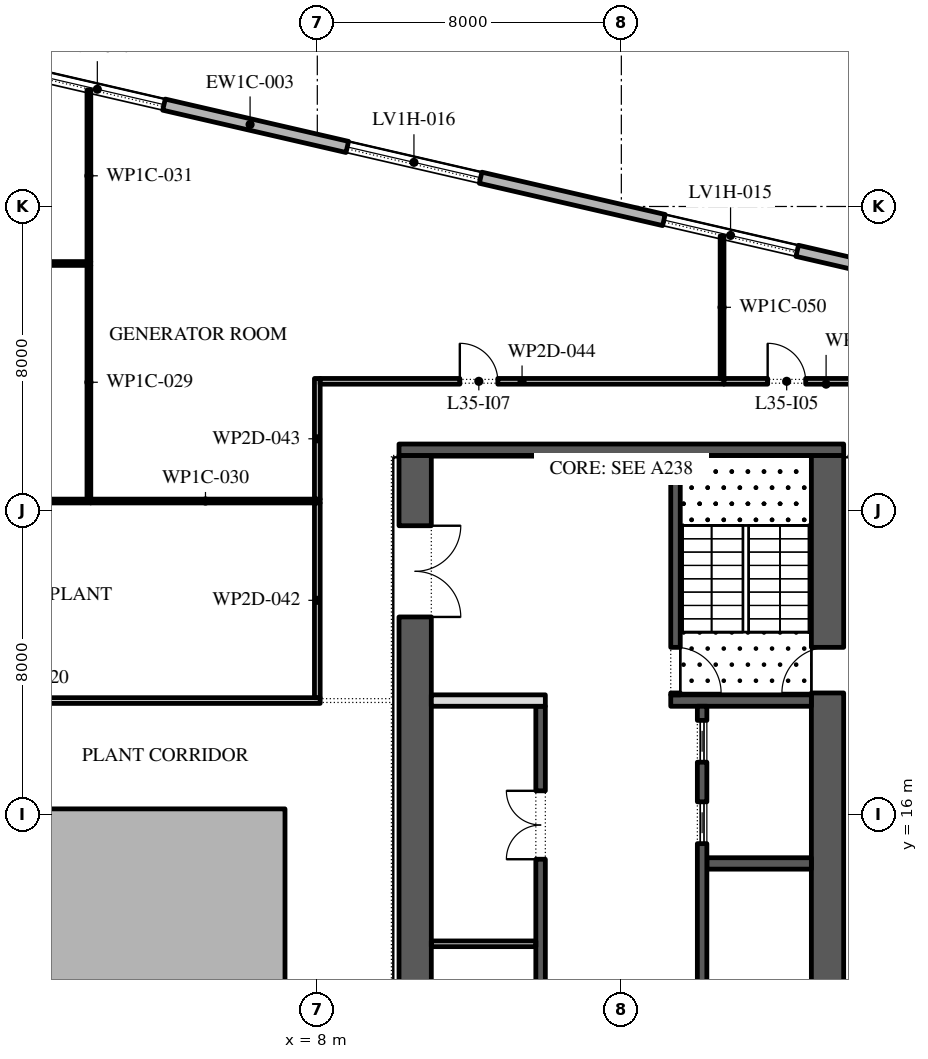
"""IFC4 building model, lengths in metres.
Left out: names, types, materials, properties, quantities, classifications, styles, units other than length and angle.
Written with IfcOpenShell. Run it as: python <this file> out.ifc"""

import sys

from ifc_helpers import new_model, si_unit, direction, frame, frame_2d, origin, place, context, subcontext, project, spatial, polyline, rectangle, outline, extrude, element, fill, save


model = new_model("IFC4")
c1 = context("Model", 3, precision=1e-05, world=origin(), true_north=direction((0.0, 1.0)))
c2 = subcontext(c1, "Body", "Model", "MODEL_VIEW")
j1 = project(units=[si_unit("LENGTHUNIT", "METRE"), si_unit("PLANEANGLEUNIT", "RADIAN")], contexts=[c1])
p1 = place(None, origin())
s1 = spatial("IfcSite", under=j1, at=p1, CompositionType="ELEMENT")
p2 = place(p1, origin())
s2 = spatial("IfcBuilding", under=s1, at=p2, CompositionType="ELEMENT")
p3 = place(p2, frame((0.0, 0.0, 160.2)))
s3 = spatial("IfcBuildingStorey", under=s2, at=p3, CompositionType="ELEMENT", Elevation=160.2)
p4 = place(p3, origin())
e1 = element("IfcWall", 1, at=p4, inside=s3, PredefinedType="STANDARD", context=c2, shape_type="SweptSolid", body=[
    extrude(outline(polyline([(-7.15, -2.15), (7.15, -2.15), (7.15, 16.15), (-7.15, 16.15), (-7.15, -2.15)]), holes=[polyline([(-7.0, -2.0), (-7.0, 16.0), (7.0, 16.0), (7.0, -2.0), (-7.0, -2.0)])]), origin(), (0.0, 0.0, 1.0), 4.95),
])
p5 = place(p3, frame((31.078, 28.421, 0.0), z_axis=(0.0, 0.0, 1.0), x_axis=(-0.974370456532, 0.224949357493, 0.0)))
e2 = element("IfcWall", 2, at=p5, inside=s3, PredefinedType="STANDARD", context=c2, shape_type="SweptSolid", body=[
    extrude(rectangle(XDim=51.0, YDim=0.3, at=frame_2d((25.5, 0.0))), origin(), (0.0, 0.0, 1.0), 4.95),
])
p6 = place(p5, frame((10.725, 0.0, 0.6)))
e3 = element("IfcOpeningElement", 3, at=p6, cuts=e2, PredefinedType="OPENING", context=c2, shape_type="SweptSolid", body=[
    extrude(rectangle(XDim=3.6, YDim=3.25, at=frame_2d((1.8, 1.625))), frame((0.0, 0.16, 0.0), z_axis=(0.0, -1.0, 0.0), x_axis=(1.0, 0.0, 0.0)), (0.0, 0.0, 1.0), 0.32),
])
p7 = place(p5, frame((19.275, 0.0, 0.6)))
e4 = element("IfcOpeningElement", 4, at=p7, cuts=e2, PredefinedType="OPENING", context=c2, shape_type="SweptSolid", body=[
    extrude(rectangle(XDim=3.6, YDim=3.25, at=frame_2d((1.8, 1.625))), frame((0.0, 0.16, 0.0), z_axis=(0.0, -1.0, 0.0), x_axis=(1.0, 0.0, 0.0)), (0.0, 0.0, 1.0), 0.32),
])
p8 = place(p5, frame((27.825, 0.0, 0.6)))
e5 = element("IfcOpeningElement", 5, at=p8, cuts=e2, PredefinedType="OPENING", context=c2, shape_type="SweptSolid", body=[
    extrude(rectangle(XDim=3.6, YDim=3.9, at=frame_2d((1.8, 1.95))), frame((0.0, 0.16, 0.0), z_axis=(0.0, -1.0, 0.0), x_axis=(1.0, 0.0, 0.0)), (0.0, 0.0, 1.0), 0.32),
])
p9 = place(p5, frame((36.375, 0.0, 0.6)))
e6 = element("IfcOpeningElement", 6, at=p9, cuts=e2, PredefinedType="OPENING", context=c2, shape_type="SweptSolid", body=[
    extrude(rectangle(XDim=3.6, YDim=3.375, at=frame_2d((1.8, 1.688))), frame((0.0, 0.16, 0.0), z_axis=(0.0, -1.0, 0.0), x_axis=(1.0, 0.0, 0.0)), (0.0, 0.0, 1.0), 0.32),
])
p10 = place(p3, frame((34.5, 35.112, -0.05), z_axis=(0.0, 0.0, 1.0), x_axis=(-0.974370602864, 0.224948723658, 0.0)))
e7 = element("IfcWall", 7, at=p10, inside=s3, PredefinedType="STANDARD", context=c2, shape_type="SweptSolid", body=[
    extrude(rectangle(XDim=54.56, YDim=0.2, at=frame_2d((27.28, 0.0))), origin(), (0.0, 0.0, 1.0), 1.1),
])
p11 = place(p3, frame((21.425, -2.45, 0.0), z_axis=(0.0, 0.0, 1.0), x_axis=(0.0, 1.0, 0.0)))
e8 = element("IfcWall", 8, at=p11, inside=s3, PredefinedType="SHEAR", context=c2, shape_type="SweptSolid", body=[
    extrude(rectangle(XDim=27.9, YDim=0.85, at=frame_2d((13.95, 0.0))), origin(), (0.0, 0.0, 1.0), 4.95),
])
p12 = place(p11, frame((5.05, 0.0, 0.0)))
e9 = element("IfcOpeningElement", 9, at=p12, cuts=e8, PredefinedType="OPENING", context=c2, shape_type="SweptSolid", body=[
    extrude(rectangle(XDim=1.2, YDim=2.1, at=frame_2d((0.6, 1.05))), frame((0.0, 0.435, 0.0), z_axis=(0.0, -1.0, 0.0), x_axis=(1.0, 0.0, 0.0)), (0.0, 0.0, 1.0), 0.87),
])
p13 = place(p11, frame((21.65, 0.0, 0.0)))
e10 = element("IfcOpeningElement", 10, at=p13, cuts=e8, PredefinedType="OPENING", context=c2, shape_type="SweptSolid", body=[
    extrude(rectangle(XDim=1.2, YDim=2.1, at=frame_2d((0.6, 1.05))), frame((0.0, 0.435, 0.0), z_axis=(0.0, -1.0, 0.0), x_axis=(1.0, 0.0, 0.0)), (0.0, 0.0, 1.0), 0.87),
])
p14 = place(p3, frame((10.575, -2.45, 0.0), z_axis=(0.0, 0.0, 1.0), x_axis=(0.0, 1.0, 0.0)))
e11 = element("IfcWall", 11, at=p14, inside=s3, PredefinedType="SHEAR", context=c2, shape_type="SweptSolid", body=[
    extrude(rectangle(XDim=27.9, YDim=0.85, at=frame_2d((13.95, 0.0))), origin(), (0.0, 0.0, 1.0), 4.95),
])
p15 = place(p14, frame((23.65, 0.0, 0.0)))
e12 = element("IfcOpeningElement", 12, at=p15, cuts=e11, PredefinedType="OPENING", context=c2, shape_type="SweptSolid", body=[
    extrude(rectangle(XDim=2.4, YDim=2.1, at=frame_2d((1.2, 1.05))), frame((0.0, 0.435, 0.0), z_axis=(0.0, -1.0, 0.0), x_axis=(1.0, 0.0, 0.0)), (0.0, 0.0, 1.0), 0.87),
])
p16 = place(p14, frame((0.938, 0.0, 0.0)))
e13 = element("IfcOpeningElement", 13, at=p16, cuts=e11, PredefinedType="OPENING", context=c2, shape_type="SweptSolid", body=[
    extrude(rectangle(XDim=1.8, YDim=2.4, at=frame_2d((0.9, 1.2))), frame((0.0, 0.435, 0.0), z_axis=(0.0, -1.0, 0.0), x_axis=(1.0, 0.0, 0.0)), (0.0, 0.0, 1.0), 0.87),
])
p17 = place(p14, frame((4.163, 0.0, 0.0)))
e14 = element("IfcOpeningElement", 14, at=p17, cuts=e11, PredefinedType="OPENING", context=c2, shape_type="SweptSolid", body=[
    extrude(rectangle(XDim=1.8, YDim=2.4, at=frame_2d((0.9, 1.2))), frame((0.0, 0.435, 0.0), z_axis=(0.0, -1.0, 0.0), x_axis=(1.0, 0.0, 0.0)), (0.0, 0.0, 1.0), 0.87),
])
p18 = place(p3, frame((10.15, 25.6, 0.0), z_axis=(0.0, 0.0, 1.0), x_axis=(1.0, 0.0, 0.0)))
e15 = element("IfcWall", 15, at=p18, inside=s3, PredefinedType="SHEAR", context=c2, shape_type="SweptSolid", body=[
    extrude(rectangle(XDim=11.7, YDim=0.3, at=frame_2d((5.85, 0.0))), origin(), (0.0, 0.0, 1.0), 4.95),
])
p19 = place(p3, frame((17.3, 19.0, 0.0), z_axis=(0.0, 0.0, 1.0), x_axis=(1.0, 0.0, 0.0)))
e16 = element("IfcWall", 16, at=p19, inside=s3, PredefinedType="SHEAR", context=c2, shape_type="SweptSolid", body=[
    extrude(rectangle(XDim=3.7, YDim=0.3, at=frame_2d((1.85, 0.0))), origin(), (0.0, 0.0, 1.0), 4.95),
])
p20 = place(p3, frame((17.425, 19.15, 0.0), z_axis=(0.0, 0.0, 1.0), x_axis=(0.0, 1.0, 0.0)))
e17 = element("IfcWall", 17, at=p20, inside=s3, PredefinedType="SHEAR", context=c2, shape_type="SweptSolid", body=[
    extrude(rectangle(XDim=6.3, YDim=0.25, at=frame_2d((3.15, 0.0))), origin(), (0.0, 0.0, 1.0), 4.95),
])
p21 = place(p20, frame((0.05, 0.0, 0.0)))
e18 = element("IfcOpeningElement", 18, at=p21, cuts=e17, PredefinedType="OPENING", context=c2, shape_type="SweptSolid", body=[
    extrude(rectangle(XDim=1.2, YDim=2.1, at=frame_2d((0.6, 1.05))), frame((0.0, 0.135, 0.0), z_axis=(0.0, -1.0, 0.0), x_axis=(1.0, 0.0, 0.0)), (0.0, 0.0, 1.0), 0.27),
])
p22 = place(p3, frame((18.25, 14.714, 0.0), z_axis=(0.0, 0.0, 1.0), x_axis=(1.0, 0.0, 0.0)))
e19 = element("IfcWall", 19, at=p22, inside=s3, PredefinedType="SHEAR", context=c2, shape_type="SweptSolid", body=[
    extrude(rectangle(XDim=2.75, YDim=0.3, at=frame_2d((1.375, 0.0))), origin(), (0.0, 0.0, 1.0), 4.95),
])
p23 = place(p3, frame((18.125, 4.15, 0.0), z_axis=(0.0, 0.0, 1.0), x_axis=(0.0, 1.0, 0.0)))
e20 = element("IfcWall", 20, at=p23, inside=s3, PredefinedType="SHEAR", context=c2, shape_type="SweptSolid", body=[
    extrude(rectangle(XDim=14.7, YDim=0.25, at=frame_2d((7.35, 0.0))), origin(), (0.0, 0.0, 1.0), 4.95),
])
p24 = place(p23, frame((0.371, 0.0, 0.0)))
e21 = element("IfcOpeningElement", 21, at=p24, cuts=e20, PredefinedType="OPENING", context=c2, shape_type="SweptSolid", body=[
    extrude(rectangle(XDim=1.1, YDim=2.1, at=frame_2d((0.55, 1.05))), frame((0.0, 0.135, 0.0), z_axis=(0.0, -1.0, 0.0), x_axis=(1.0, 0.0, 0.0)), (0.0, 0.0, 1.0), 0.27),
])
p25 = place(p23, frame((11.086, 0.0, 0.0)))
e22 = element("IfcOpeningElement", 22, at=p25, cuts=e20, PredefinedType="OPENING", context=c2, shape_type="SweptSolid", body=[
    extrude(rectangle(XDim=1.1, YDim=2.1, at=frame_2d((0.55, 1.05))), frame((0.0, 0.135, 0.0), z_axis=(0.0, -1.0, 0.0), x_axis=(1.0, 0.0, 0.0)), (0.0, 0.0, 1.0), 0.27),
])
p26 = place(p23, frame((13.229, 0.0, 0.0)))
e23 = element("IfcOpeningElement", 23, at=p26, cuts=e20, PredefinedType="OPENING", context=c2, shape_type="SweptSolid", body=[
    extrude(rectangle(XDim=1.1, YDim=2.1, at=frame_2d((0.55, 1.05))), frame((0.0, 0.135, 0.0), z_axis=(0.0, -1.0, 0.0), x_axis=(1.0, 0.0, 0.0)), (0.0, 0.0, 1.0), 0.27),
])
p27 = place(p3, frame((13.875, -2.45, 0.0), z_axis=(0.0, 0.0, 1.0), x_axis=(0.0, 1.0, 0.0)))
e24 = element("IfcWall", 24, at=p27, inside=s3, PredefinedType="SHEAR", context=c2, shape_type="SweptSolid", body=[
    extrude(rectangle(XDim=21.3, YDim=0.25, at=frame_2d((10.65, 0.0))), origin(), (0.0, 0.0, 1.0), 4.95),
])
p28 = place(p27, frame((10.996, 0.0, 0.0)))
e25 = element("IfcOpeningElement", 25, at=p28, cuts=e24, PredefinedType="OPENING", context=c2, shape_type="SweptSolid", body=[
    extrude(rectangle(XDim=1.8, YDim=2.4, at=frame_2d((0.9, 1.2))), frame((0.0, 0.135, 0.0), z_axis=(0.0, -1.0, 0.0), x_axis=(1.0, 0.0, 0.0)), (0.0, 0.0, 1.0), 0.27),
])
p29 = place(p27, frame((17.275, 0.0, 0.0)))
e26 = element("IfcOpeningElement", 26, at=p29, cuts=e24, PredefinedType="OPENING", context=c2, shape_type="SweptSolid", body=[
    extrude(rectangle(XDim=1.8, YDim=2.4, at=frame_2d((0.9, 1.2))), frame((0.0, 0.135, 0.0), z_axis=(0.0, -1.0, 0.0), x_axis=(1.0, 0.0, 0.0)), (0.0, 0.0, 1.0), 0.27),
])
p30 = place(p27, frame((6.971, 0.0, 0.0)))
e27 = element("IfcOpeningElement", 27, at=p30, cuts=e24, PredefinedType="OPENING", context=c2, shape_type="SweptSolid", body=[
    extrude(rectangle(XDim=1.1, YDim=2.1, at=frame_2d((0.55, 1.05))), frame((0.0, 0.135, 0.0), z_axis=(0.0, -1.0, 0.0), x_axis=(1.0, 0.0, 0.0)), (0.0, 0.0, 1.0), 0.27),
])
p31 = place(p3, frame((11.0, 19.0, 0.0), z_axis=(0.0, 0.0, 1.0), x_axis=(1.0, 0.0, 0.0)))
e28 = element("IfcWall", 28, at=p31, inside=s3, PredefinedType="PARTITIONING", context=c2, shape_type="SweptSolid", body=[
    extrude(rectangle(XDim=3.0, YDim=0.3, at=frame_2d((1.5, 0.0))), origin(), (0.0, 0.0, 1.0), 4.95),
])
p32 = place(p3, frame((11.0, 12.6, 0.0), z_axis=(0.0, 0.0, 1.0), x_axis=(1.0, 0.0, 0.0)))
e29 = element("IfcWall", 29, at=p32, inside=s3, PredefinedType="PARTITIONING", context=c2, shape_type="SweptSolid", body=[
    extrude(rectangle(XDim=2.75, YDim=0.15, at=frame_2d((1.375, 0.0))), origin(), (0.0, 0.0, 1.0), 4.95),
])
p33 = place(p3, frame((-14.62, 30.5, 0.0), z_axis=(0.0, 0.0, 1.0), x_axis=(1.0, 0.0, 0.0)))
e30 = element("IfcWall", 30, at=p33, inside=s3, PredefinedType="PARTITIONING", context=c2, shape_type="SweptSolid", body=[
    extrude(rectangle(XDim=16.66, YDim=0.1, at=frame_2d((8.33, 0.0))), origin(), (0.0, 0.0, 1.0), 4.95),
])
p34 = place(p33, frame((9.51, 0.0, 0.0)))
e31 = element("IfcOpeningElement", 31, at=p34, cuts=e30, PredefinedType="OPENING", context=c2, shape_type="SweptSolid", body=[
    extrude(rectangle(XDim=0.9, YDim=2.1, at=frame_2d((0.45, 1.05))), frame((0.0, 0.06, 0.0), z_axis=(0.0, -1.0, 0.0), x_axis=(1.0, 0.0, 0.0)), (0.0, 0.0, 1.0), 0.12),
])
p35 = place(p3, frame((-8.075, 19.0, 0.0), z_axis=(0.0, 0.0, 1.0), x_axis=(1.0, 0.0, 0.0)))
e32 = element("IfcWall", 32, at=p35, inside=s3, PredefinedType="PARTITIONING", context=c2, shape_type="SweptSolid", body=[
    extrude(rectangle(XDim=16.15, YDim=0.15, at=frame_2d((8.075, 0.0))), origin(), (0.0, 0.0, 1.0), 4.95),
])
p36 = place(p35, frame((5.925, 0.0, 0.0)))
e33 = element("IfcOpeningElement", 33, at=p36, cuts=e32, PredefinedType="OPENING", context=c2, shape_type="SweptSolid", body=[
    extrude(rectangle(XDim=1.0, YDim=2.1, at=frame_2d((0.5, 1.05))), frame((0.0, 0.085, 0.0), z_axis=(0.0, -1.0, 0.0), x_axis=(1.0, 0.0, 0.0)), (0.0, 0.0, 1.0), 0.17),
])
p37 = place(p3, frame((-7.925, 24.25, 0.0), z_axis=(0.0, 0.0, 1.0), x_axis=(1.0, 0.0, 0.0)))
e34 = element("IfcWall", 34, at=p37, inside=s3, PredefinedType="PARTITIONING", context=c2, shape_type="SweptSolid", body=[
    extrude(rectangle(XDim=9.965, YDim=0.1, at=frame_2d((4.982, 0.0))), origin(), (0.0, 0.0, 1.0), 4.95),
])
p38 = place(p3, frame((1.99, 24.3, 0.0), z_axis=(0.0, 0.0, 1.0), x_axis=(0.0, 1.0, 0.0)))
e35 = element("IfcWall", 35, at=p38, inside=s3, PredefinedType="PARTITIONING", context=c2, shape_type="SweptSolid", body=[
    extrude(rectangle(XDim=6.15, YDim=0.1, at=frame_2d((3.075, 0.0))), origin(), (0.0, 0.0, 1.0), 4.95),
])
p39 = place(p3, frame((2.04, 24.25, 0.0), z_axis=(0.0, 0.0, 1.0), x_axis=(1.0, 0.0, 0.0)))
e36 = element("IfcWall", 36, at=p39, inside=s3, PredefinedType="PARTITIONING", context=c2, shape_type="SweptSolid", body=[
    extrude(rectangle(XDim=6.035, YDim=0.1, at=frame_2d((3.018, 0.0))), origin(), (0.0, 0.0, 1.0), 4.95),
])
p40 = place(p3, frame((1.99, 30.55, 0.0), z_axis=(0.0, 0.0, 1.0), x_axis=(0.0, 1.0, 0.0)))
e37 = element("IfcWall", 37, at=p40, inside=s3, PredefinedType="PARTITIONING", context=c2, shape_type="SweptSolid", body=[
    extrude(rectangle(XDim=4.515, YDim=0.1, at=frame_2d((2.257, 0.0))), origin(), (0.0, 0.0, 1.0), 4.95),
])
p41 = place(p3, frame((8.0, 19.075, 0.0), z_axis=(0.0, 0.0, 1.0), x_axis=(0.0, 1.0, 0.0)))
e38 = element("IfcWall", 38, at=p41, inside=s3, PredefinedType="PARTITIONING", context=c2, shape_type="SweptSolid", body=[
    extrude(rectangle(XDim=5.125, YDim=0.15, at=frame_2d((2.562, 0.0))), origin(), (0.0, 0.0, 1.0), 4.95),
])
p42 = place(p3, frame((8.0, 24.3, 0.0), z_axis=(0.0, 0.0, 1.0), x_axis=(0.0, 1.0, 0.0)))
e39 = element("IfcWall", 39, at=p42, inside=s3, PredefinedType="PARTITIONING", context=c2, shape_type="SweptSolid", body=[
    extrude(rectangle(XDim=3.175, YDim=0.15, at=frame_2d((1.587, 0.0))), origin(), (0.0, 0.0, 1.0), 4.95),
])
p43 = place(p3, frame((8.075, 27.4, 0.0), z_axis=(0.0, 0.0, 1.0), x_axis=(1.0, 0.0, 0.0)))
e40 = element("IfcWall", 40, at=p43, inside=s3, PredefinedType="PARTITIONING", context=c2, shape_type="SweptSolid", body=[
    extrude(rectangle(XDim=10.625, YDim=0.15, at=frame_2d((5.312, 0.0))), origin(), (0.0, 0.0, 1.0), 4.95),
])
p44 = place(p43, frame((3.675, 0.0, 0.0)))
e41 = element("IfcOpeningElement", 41, at=p44, cuts=e40, PredefinedType="OPENING", context=c2, shape_type="SweptSolid", body=[
    extrude(rectangle(XDim=1.0, YDim=2.1, at=frame_2d((0.5, 1.05))), frame((0.0, 0.085, 0.0), z_axis=(0.0, -1.0, 0.0), x_axis=(1.0, 0.0, 0.0)), (0.0, 0.0, 1.0), 0.17),
])
p45 = place(p3, frame((18.65, 27.475, 0.0), z_axis=(0.0, 0.0, 1.0), x_axis=(0.0, 1.0, 0.0)))
e42 = element("IfcWall", 42, at=p45, inside=s3, PredefinedType="PARTITIONING", context=c2, shape_type="SweptSolid", body=[
    extrude(rectangle(XDim=3.744, YDim=0.1, at=frame_2d((1.872, 0.0))), origin(), (0.0, 0.0, 1.0), 4.95),
])
p46 = place(p3, frame((18.7, 27.4, 0.0), z_axis=(0.0, 0.0, 1.0), x_axis=(1.0, 0.0, 0.0)))
e43 = element("IfcWall", 43, at=p46, inside=s3, PredefinedType="PARTITIONING", context=c2, shape_type="SweptSolid", body=[
    extrude(rectangle(XDim=5.375, YDim=0.15, at=frame_2d((2.688, 0.0))), origin(), (0.0, 0.0, 1.0), 4.95),
])
p47 = place(p46, frame((1.15, 0.0, 0.0)))
e44 = element("IfcOpeningElement", 44, at=p47, cuts=e43, PredefinedType="OPENING", context=c2, shape_type="SweptSolid", body=[
    extrude(rectangle(XDim=1.0, YDim=2.1, at=frame_2d((0.5, 1.05))), frame((0.0, 0.085, 0.0), z_axis=(0.0, -1.0, 0.0), x_axis=(1.0, 0.0, 0.0)), (0.0, 0.0, 1.0), 0.17),
])
p48 = place(p6, origin())
e45 = element("IfcWindow", 45, at=p48, inside=s3, PartitioningType="DOUBLE_PANEL_HORIZONTAL", PredefinedType="WINDOW", context=c2, shape_type="SweptSolid", body=[
    extrude(rectangle(XDim=3.6, YDim=3.25, at=frame_2d((1.8, 1.625))), frame((0.0, 0.03, 0.0), z_axis=(0.0, -1.0, 0.0), x_axis=(1.0, 0.0, 0.0)), (0.0, 0.0, 1.0), 0.06),
])
fill(e3, e45)
p49 = place(p7, origin())
e46 = element("IfcWindow", 46, at=p49, inside=s3, PartitioningType="DOUBLE_PANEL_HORIZONTAL", PredefinedType="WINDOW", context=c2, shape_type="SweptSolid", body=[
    extrude(rectangle(XDim=3.6, YDim=3.25, at=frame_2d((1.8, 1.625))), frame((0.0, 0.03, 0.0), z_axis=(0.0, -1.0, 0.0), x_axis=(1.0, 0.0, 0.0)), (0.0, 0.0, 1.0), 0.06),
])
fill(e4, e46)
p50 = place(p8, origin())
e47 = element("IfcWindow", 47, at=p50, inside=s3, PartitioningType="DOUBLE_PANEL_HORIZONTAL", PredefinedType="WINDOW", context=c2, shape_type="SweptSolid", body=[
    extrude(rectangle(XDim=3.6, YDim=3.9, at=frame_2d((1.8, 1.95))), frame((0.0, 0.03, 0.0), z_axis=(0.0, -1.0, 0.0), x_axis=(1.0, 0.0, 0.0)), (0.0, 0.0, 1.0), 0.06),
])
fill(e5, e47)
p51 = place(p25, origin())
e48 = element("IfcDoor", 48, at=p51, inside=s3, OperationType="SLIDING_TO_LEFT", PredefinedType="DOOR", context=c2, shape_type="SweptSolid", body=[
    extrude(rectangle(XDim=1.1, YDim=2.1, at=frame_2d((0.55, 1.05))), frame((0.0, 0.025, 0.0), z_axis=(0.0, -1.0, 0.0), x_axis=(1.0, 0.0, 0.0)), (0.0, 0.0, 1.0), 0.05),
])
fill(e22, e48)
p52 = place(p26, origin())
e49 = element("IfcDoor", 49, at=p52, inside=s3, OperationType="SLIDING_TO_LEFT", PredefinedType="DOOR", context=c2, shape_type="SweptSolid", body=[
    extrude(rectangle(XDim=1.1, YDim=2.1, at=frame_2d((0.55, 1.05))), frame((0.0, 0.025, 0.0), z_axis=(0.0, -1.0, 0.0), x_axis=(1.0, 0.0, 0.0)), (0.0, 0.0, 1.0), 0.05),
])
fill(e23, e49)
p53 = place(p29, origin())
e50 = element("IfcDoor", 50, at=p53, inside=s3, OperationType="DOUBLE_DOOR_SINGLE_SWING", PredefinedType="DOOR", context=c2, shape_type="SweptSolid", body=[
    extrude(rectangle(XDim=1.8, YDim=2.4, at=frame_2d((0.9, 1.2))), frame((0.0, 0.125, 0.0), z_axis=(0.0, -1.0, 0.0), x_axis=(1.0, 0.0, 0.0)), (0.0, 0.0, 1.0), 0.05),
])
fill(e26, e50)
p54 = place(p15, frame((2.4, 0.0, 0.0), z_axis=(0.0, 0.0, 1.0), x_axis=(-1.0, 0.0, 0.0)))
e51 = element("IfcDoor", 51, at=p54, inside=s3, OperationType="DOUBLE_DOOR_SINGLE_SWING", PredefinedType="DOOR", context=c2, shape_type="SweptSolid", body=[
    extrude(rectangle(XDim=2.4, YDim=2.1, at=frame_2d((1.2, 1.05))), frame((0.0, 0.025, 0.0), z_axis=(0.0, -1.0, 0.0), x_axis=(1.0, 0.0, 0.0)), (0.0, 0.0, 1.0), 0.05),
])
fill(e12, e51)
p55 = place(p21, frame((1.2, 0.0, 0.0), z_axis=(0.0, 0.0, 1.0), x_axis=(-1.0, 0.0, 0.0)))
e52 = element("IfcDoor", 52, at=p55, inside=s3, OperationType="SINGLE_SWING_LEFT", PredefinedType="DOOR", context=c2, shape_type="SweptSolid", body=[
    extrude(rectangle(XDim=1.2, YDim=2.1, at=frame_2d((0.6, 1.05))), frame((0.0, 0.025, 0.0), z_axis=(0.0, -1.0, 0.0), x_axis=(1.0, 0.0, 0.0)), (0.0, 0.0, 1.0), 0.05),
])
fill(e18, e52)
p56 = place(p13, origin())
e53 = element("IfcDoor", 53, at=p56, inside=s3, OperationType="SINGLE_SWING_RIGHT", PredefinedType="DOOR", context=c2, shape_type="SweptSolid", body=[
    extrude(rectangle(XDim=1.2, YDim=2.1, at=frame_2d((0.6, 1.05))), frame((0.0, 0.025, 0.0), z_axis=(0.0, -1.0, 0.0), x_axis=(1.0, 0.0, 0.0)), (0.0, 0.0, 1.0), 0.05),
])
fill(e10, e53)
p57 = place(p47, origin())
e54 = element("IfcDoor", 54, at=p57, inside=s3, OperationType="SINGLE_SWING_RIGHT", PredefinedType="DOOR", context=c2, shape_type="SweptSolid", body=[
    extrude(rectangle(XDim=1.0, YDim=2.1, at=frame_2d((0.5, 1.05))), frame((0.0, 0.025, 0.0), z_axis=(0.0, -1.0, 0.0), x_axis=(1.0, 0.0, 0.0)), (0.0, 0.0, 1.0), 0.05),
])
fill(e44, e54)
p58 = place(p44, origin())
e55 = element("IfcDoor", 55, at=p58, inside=s3, OperationType="SINGLE_SWING_RIGHT", PredefinedType="DOOR", context=c2, shape_type="SweptSolid", body=[
    extrude(rectangle(XDim=1.0, YDim=2.1, at=frame_2d((0.5, 1.05))), frame((0.0, 0.025, 0.0), z_axis=(0.0, -1.0, 0.0), x_axis=(1.0, 0.0, 0.0)), (0.0, 0.0, 1.0), 0.05),
])
fill(e41, e55)
save(model, sys.argv[1])
